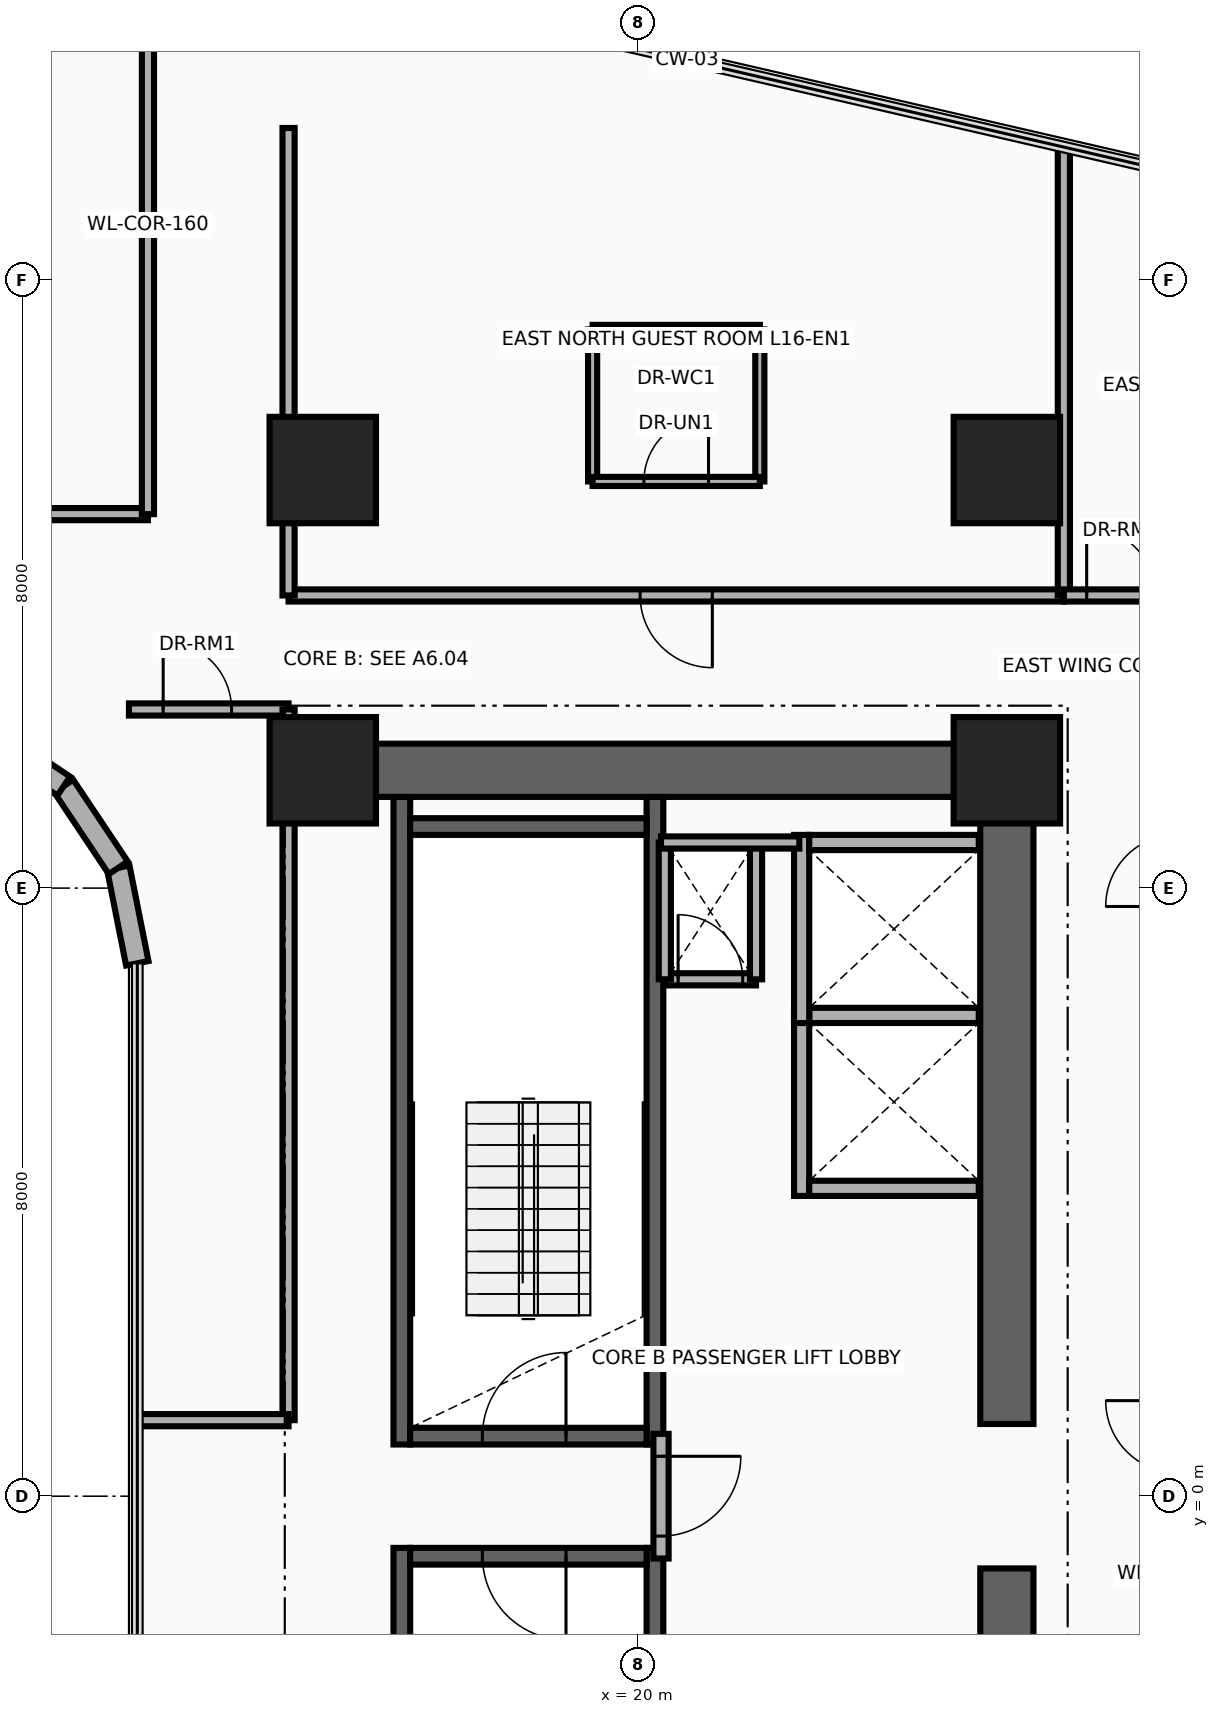
"""IFC4 building model, lengths in metres.
Left out: names, types, materials, properties, quantities, classifications, styles, units other than length and angle.
Written with IfcOpenShell. Run it as: python <this file> out.ifc"""

import sys

from ifc_helpers import new_model, si_unit, direction, frame, frame_2d, origin, origin_2d, place, context, subcontext, project, spatial, rectangle, extrude, source, transform, mapped, element, fill, save


model = new_model("IFC4")
c1 = context("Model", 3, precision=1e-05, world=origin(), true_north=direction((0.0, 1.0)))
c2 = subcontext(c1, "Body", "Model", "MODEL_VIEW")
j1 = project(units=[si_unit("LENGTHUNIT", "METRE"), si_unit("PLANEANGLEUNIT", "RADIAN")], contexts=[c1])
p1 = place(None, origin())
s1 = spatial("IfcSite", under=j1, at=p1, CompositionType="ELEMENT")
p2 = place(p1, origin())
s2 = spatial("IfcBuilding", under=s1, at=p2, CompositionType="ELEMENT")
p3 = place(p2, frame((0.0, 0.0, 66.7)))
s3 = spatial("IfcBuildingStorey", under=s2, at=p3, CompositionType="ELEMENT", Elevation=66.7)
for number, where, z_axis, x_axis in (
    (1, (16.89, 0.68, 0.0), (0.0, 0.0, 1.0), (0.0, 1.0, 0.0)),
    (2, (20.22, 0.68, 0.0), (0.0, 0.0, 1.0), (0.0, 1.0, 0.0)),
):
    element("IfcWall", number, at=place(p3, frame(where, z_axis=z_axis, x_axis=x_axis)), inside=s3, PredefinedType="SHEAR", context=c2, shape_type="SweptSolid", body=[
        extrude(rectangle(XDim=8.52, YDim=0.22, at=frame_2d((4.26, 0.0))), origin(), (0.0, 0.0, 1.0), 3.46),
    ])
p4 = place(p3, frame((17.0, 0.79, 0.0), z_axis=(0.0, 0.0, 1.0), x_axis=(1.0, 0.0, 0.0)))
e3 = element("IfcWall", 3, at=p4, inside=s3, PredefinedType="SHEAR", context=c2, shape_type="SweptSolid", body=[
    extrude(rectangle(XDim=3.11, YDim=0.22, at=frame_2d((1.555, 0.0))), origin(), (0.0, 0.0, 1.0), 3.46),
])
p5 = place(p4, frame((0.95, 0.0, 0.0)))
e4 = element("IfcOpeningElement", 4, at=p5, cuts=e3, PredefinedType="OPENING", context=c2, shape_type="SweptSolid", body=[
    extrude(rectangle(XDim=1.1, YDim=2.15, at=frame_2d((0.55, 1.075))), frame((0.0, 0.125, 0.0), z_axis=(0.0, -1.0, 0.0), x_axis=(1.0, 0.0, 0.0)), (0.0, 0.0, 1.0), 0.25),
])
p6 = place(p3, frame((17.0, 8.81, 0.0), z_axis=(0.0, 0.0, 1.0), x_axis=(1.0, 0.0, 0.0)))
e5 = element("IfcWall", 5, at=p6, inside=s3, PredefinedType="SHEAR", context=c2, shape_type="SweptSolid", body=[
    extrude(rectangle(XDim=3.11, YDim=0.22, at=frame_2d((1.555, 0.0))), origin(), (0.0, 0.0, 1.0), 3.46),
])
for number, where, z_axis, x_axis in (
    (6, (16.89, -9.2, 0.0), (0.0, 0.0, 1.0), (0.0, 1.0, 0.0)),
    (7, (20.22, -9.2, 0.0), (0.0, 0.0, 1.0), (0.0, 1.0, 0.0)),
):
    element("IfcWall", number, at=place(p3, frame(where, z_axis=z_axis, x_axis=x_axis)), inside=s3, PredefinedType="SHEAR", context=c2, shape_type="SweptSolid", body=[
        extrude(rectangle(XDim=8.52, YDim=0.22, at=frame_2d((4.26, 0.0))), origin(), (0.0, 0.0, 1.0), 3.46),
    ])
p7 = place(p3, frame((17.0, -0.79, 0.0), z_axis=(0.0, 0.0, 1.0), x_axis=(1.0, 0.0, 0.0)))
e8 = element("IfcWall", 8, at=p7, inside=s3, PredefinedType="SHEAR", context=c2, shape_type="SweptSolid", body=[
    extrude(rectangle(XDim=3.11, YDim=0.22, at=frame_2d((1.555, 0.0))), origin(), (0.0, 0.0, 1.0), 3.46),
])
p8 = place(p7, frame((0.95, 0.0, 0.0)))
e9 = element("IfcOpeningElement", 9, at=p8, cuts=e8, PredefinedType="OPENING", context=c2, shape_type="SweptSolid", body=[
    extrude(rectangle(XDim=1.1, YDim=2.15, at=frame_2d((0.55, 1.075))), frame((0.0, 0.125, 0.0), z_axis=(0.0, -1.0, 0.0), x_axis=(1.0, 0.0, 0.0)), (0.0, 0.0, 1.0), 0.25),
])
for number, where, z_axis, x_axis in (
    (10, (24.85, -9.9, 0.0), (0.0, 0.0, 1.0), (0.0, 1.0, 0.0)),
    (11, (24.85, 0.95, 0.0), (0.0, 0.0, 1.0), (0.0, 1.0, 0.0)),
):
    element("IfcWall", number, at=place(p3, frame(where, z_axis=z_axis, x_axis=x_axis)), inside=s3, PredefinedType="SHEAR", context=c2, shape_type="SweptSolid", body=[
        extrude(rectangle(XDim=8.95, YDim=0.7, at=frame_2d((4.475, 0.0))), origin(), (0.0, 0.0, 1.0), 3.46),
    ])
p9 = place(p3, frame((15.85, 9.55, 0.0), z_axis=(0.0, 0.0, 1.0), x_axis=(1.0, 0.0, 0.0)))
e12 = element("IfcWall", 12, at=p9, inside=s3, PredefinedType="SHEAR", context=c2, shape_type="SweptSolid", body=[
    extrude(rectangle(XDim=9.0, YDim=0.7, at=frame_2d((4.5, 0.0))), origin(), (0.0, 0.0, 1.0), 3.46),
])
m1 = source(origin(), c2, "Body", "SweptSolid", [
    extrude(rectangle(XDim=1.4, YDim=1.4, at=origin_2d()), origin(), (0.0, 0.0, 1.0), 3.7),
])
for number, where, z_axis, x_axis in (
    (13, (15.85, 9.55, 0.0), (0.0, 0.0, 1.0), (1.0, 0.0, 0.0)),
    (14, (24.85, 9.55, 0.0), (0.0, 0.0, 1.0), (1.0, 0.0, 0.0)),
    (15, (15.85, 13.5, 0.0), (0.0, 0.0, 1.0), (1.0, 0.0, 0.0)),
    (16, (24.85, 13.5, 0.0), (0.0, 0.0, 1.0), (1.0, 0.0, 0.0)),
):
    element("IfcColumn", number, at=place(p3, frame(where, z_axis=z_axis, x_axis=x_axis)), inside=s3, PredefinedType="COLUMN", context=c2, shape_type="MappedRepresentation", body=[
        mapped(m1, transform((0.0, 0.0, 0.0), x_axis=(1.0, 0.0, 0.0), y_axis=(0.0, 1.0, 0.0), z_axis=(0.0, 0.0, 1.0), scale=1.0)),
    ])
p10 = place(p3, frame((13.41, 7.011, 0.0), z_axis=(0.0, 0.0, 1.0), x_axis=(-0.195090163074, 0.980785312019, 0.0)))
e17 = element("IfcWall", 17, at=p10, inside=s3, PredefinedType="SOLIDWALL", context=c2, shape_type="SweptSolid", body=[
    extrude(rectangle(XDim=1.281, YDim=0.3, at=frame_2d((0.641, 0.0))), origin(), (0.0, 0.0, 1.0), 3.46),
])
for number, where, z_axis, x_axis in (
    (18, (13.16, 8.268, 0.0), (0.0, 0.0, 1.0), (-0.556, 0.831, 0.0)),
    (19, (12.442, 9.342, 0.0), (0.0, 0.0, 1.0), (-0.831, 0.556, 0.0)),
):
    element("IfcWall", number, at=place(p3, frame(where, z_axis=z_axis, x_axis=x_axis)), inside=s3, PredefinedType="SOLIDWALL", context=c2, shape_type="SweptSolid", body=[
        extrude(rectangle(XDim=1.292, YDim=0.3, at=frame_2d((0.646, 0.0))), origin(), (0.0, 0.0, 1.0), 3.46),
    ])
p11 = place(p3, frame((22.15, 3.95, 0.0), z_axis=(0.0, 0.0, 1.0), x_axis=(0.0, 1.0, 0.0)))
e20 = element("IfcWall", 20, at=p11, inside=s3, PredefinedType="MOVABLE", context=c2, shape_type="SweptSolid", body=[
    extrude(rectangle(XDim=2.475, YDim=0.2, at=frame_2d((1.238, 0.0))), origin(), (0.0, 0.0, 1.0), 3.46),
])
for number, where, z_axis, x_axis in (
    (21, (22.25, 4.05, 0.0), (0.0, 0.0, 1.0), (1.0, 0.0, 0.0)),
    (22, (22.25, 6.325, 0.0), (0.0, 0.0, 1.0), (1.0, 0.0, 0.0)),
):
    element("IfcWall", number, at=place(p3, frame(where, z_axis=z_axis, x_axis=x_axis)), inside=s3, PredefinedType="MOVABLE", context=c2, shape_type="SweptSolid", body=[
        extrude(rectangle(XDim=2.23, YDim=0.2, at=frame_2d((1.115, 0.0))), origin(), (0.0, 0.0, 1.0), 2.245),
    ])
p12 = place(p3, frame((22.15, 6.225, 0.0), z_axis=(0.0, 0.0, 1.0), x_axis=(0.0, 1.0, 0.0)))
e23 = element("IfcWall", 23, at=p12, inside=s3, PredefinedType="MOVABLE", context=c2, shape_type="SweptSolid", body=[
    extrude(rectangle(XDim=2.475, YDim=0.2, at=frame_2d((1.237, 0.0))), origin(), (0.0, 0.0, 1.0), 3.46),
])
p13 = place(p3, frame((22.25, 8.6, 0.0), z_axis=(0.0, 0.0, 1.0), x_axis=(1.0, 0.0, 0.0)))
e24 = element("IfcWall", 24, at=p13, inside=s3, PredefinedType="MOVABLE", context=c2, shape_type="SweptSolid", body=[
    extrude(rectangle(XDim=2.23, YDim=0.2, at=frame_2d((1.115, 0.0))), origin(), (0.0, 0.0, 1.0), 2.245),
])
p14 = place(p3, frame((20.3, -0.82, 0.0), z_axis=(0.0, 0.0, 1.0), x_axis=(0.0, 1.0, 0.0)))
e25 = element("IfcWall", 25, at=p14, inside=s3, PredefinedType="PARTITIONING", context=c2, shape_type="SweptSolid", body=[
    extrude(rectangle(XDim=1.64, YDim=0.2, at=frame_2d((0.82, 0.0))), origin(), (0.0, 0.0, 1.0), 3.46),
])
p15 = place(p14, frame((0.295, 0.0, 0.0)))
e26 = element("IfcOpeningElement", 26, at=p15, cuts=e25, PredefinedType="OPENING", context=c2, shape_type="SweptSolid", body=[
    extrude(rectangle(XDim=1.05, YDim=2.15, at=frame_2d((0.525, 1.075))), frame((0.0, 0.115, 0.0), z_axis=(0.0, -1.0, 0.0), x_axis=(1.0, 0.0, 0.0)), (0.0, 0.0, 1.0), 0.23),
])
p16 = place(p3, frame((20.35, 6.8, 0.0), z_axis=(0.0, 0.0, 1.0), x_axis=(1.0, 0.0, 0.0)))
e27 = element("IfcWall", 27, at=p16, inside=s3, PredefinedType="PARTITIONING", context=c2, shape_type="SweptSolid", body=[
    extrude(rectangle(XDim=1.2, YDim=0.16, at=frame_2d((0.6, 0.0))), origin(), (0.0, 0.0, 1.0), 3.46),
])
p17 = place(p16, frame((0.175, 0.0, 0.0)))
e28 = element("IfcOpeningElement", 28, at=p17, cuts=e27, PredefinedType="OPENING", context=c2, shape_type="SweptSolid", body=[
    extrude(rectangle(XDim=0.85, YDim=2.05, at=frame_2d((0.425, 1.025))), frame((0.0, 0.095, 0.0), z_axis=(0.0, -1.0, 0.0), x_axis=(1.0, 0.0, 0.0)), (0.0, 0.0, 1.0), 0.19),
])
for number, where, z_axis, x_axis in (
    (29, (21.55, 6.8, 0.0), (0.0, 0.0, 1.0), (0.0, 1.0, 0.0)),
    (30, (20.35, 6.8, 0.0), (0.0, 0.0, 1.0), (0.0, 1.0, 0.0)),
):
    element("IfcWall", number, at=place(p3, frame(where, z_axis=z_axis, x_axis=x_axis)), inside=s3, PredefinedType="PARTITIONING", context=c2, shape_type="SweptSolid", body=[
        extrude(rectangle(XDim=1.8, YDim=0.16, at=frame_2d((0.9, 0.0))), origin(), (0.0, 0.0, 1.0), 3.46),
    ])
p18 = place(p3, frame((20.3, 8.6, 0.0), z_axis=(0.0, 0.0, 1.0), x_axis=(1.0, 0.0, 0.0)))
e31 = element("IfcWall", 31, at=p18, inside=s3, PredefinedType="PARTITIONING", context=c2, shape_type="SweptSolid", body=[
    extrude(rectangle(XDim=1.82, YDim=0.16, at=frame_2d((0.91, 0.0))), origin(), (0.0, 0.0, 1.0), 3.46),
])
p19 = place(p3, frame((-31.89, 12.92, 0.0), z_axis=(0.0, 0.0, 1.0), x_axis=(1.0, 0.0, 0.0)))
e32 = element("IfcWall", 32, at=p19, inside=s3, PredefinedType="PARTITIONING", context=c2, shape_type="SweptSolid", body=[
    extrude(rectangle(XDim=45.44, YDim=0.16, at=frame_2d((22.72, 0.0))), origin(), (0.0, 0.0, 1.0), 2.583),
])
p20 = place(p19, frame((6.057, 0.0, 0.0)))
e33 = element("IfcOpeningElement", 33, at=p20, cuts=e32, PredefinedType="OPENING", context=c2, shape_type="SweptSolid", body=[
    extrude(rectangle(XDim=1.8, YDim=2.15, at=frame_2d((0.9, 1.075))), frame((0.0, 0.095, 0.0), z_axis=(0.0, -1.0, 0.0), x_axis=(1.0, 0.0, 0.0)), (0.0, 0.0, 1.0), 0.19),
])
p21 = place(p19, frame((20.895, 0.0, 0.0)))
e34 = element("IfcOpeningElement", 34, at=p21, cuts=e32, PredefinedType="OPENING", context=c2, shape_type="SweptSolid", body=[
    extrude(rectangle(XDim=1.8, YDim=2.15, at=frame_2d((0.9, 1.075))), frame((0.0, 0.095, 0.0), z_axis=(0.0, -1.0, 0.0), x_axis=(1.0, 0.0, 0.0)), (0.0, 0.0, 1.0), 0.19),
])
p22 = place(p19, frame((36.658, 0.0, 0.0)))
e35 = element("IfcOpeningElement", 35, at=p22, cuts=e32, PredefinedType="OPENING", context=c2, shape_type="SweptSolid", body=[
    extrude(rectangle(XDim=1.8, YDim=2.15, at=frame_2d((0.9, 1.075))), frame((0.0, 0.095, 0.0), z_axis=(0.0, -1.0, 0.0), x_axis=(1.0, 0.0, 0.0)), (0.0, 0.0, 1.0), 0.19),
])
p23 = place(p3, frame((13.55, 12.92, 0.0), z_axis=(0.0, 0.0, 1.0), x_axis=(0.0, 1.0, 0.0)))
e36 = element("IfcWall", 36, at=p23, inside=s3, PredefinedType="PARTITIONING", context=c2, shape_type="SweptSolid", body=[
    extrude(rectangle(XDim=7.609, YDim=0.16, at=frame_2d((3.805, 0.0))), origin(), (0.0, 0.0, 1.0), 2.583),
])
p24 = place(p3, frame((15.4, 11.85, 0.0), z_axis=(0.0, 0.0, 1.0), x_axis=(1.0, 0.0, 0.0)))
e37 = element("IfcWall", 37, at=p24, inside=s3, PredefinedType="PARTITIONING", context=c2, shape_type="SweptSolid", body=[
    extrude(rectangle(XDim=10.2, YDim=0.16, at=frame_2d((5.1, 0.0))), origin(), (0.0, 0.0, 1.0), 2.834),
])
p25 = place(p24, frame((4.625, 0.0, 0.0)))
e38 = element("IfcOpeningElement", 38, at=p25, cuts=e37, PredefinedType="OPENING", context=c2, shape_type="SweptSolid", body=[
    extrude(rectangle(XDim=0.95, YDim=2.15, at=frame_2d((0.475, 1.075))), frame((0.0, 0.095, 0.0), z_axis=(0.0, -1.0, 0.0), x_axis=(1.0, 0.0, 0.0)), (0.0, 0.0, 1.0), 0.19),
])
p26 = place(p3, frame((15.4, 11.85, 0.0), z_axis=(0.0, 0.0, 1.0), x_axis=(0.0, 1.0, 0.0)))
e39 = element("IfcWall", 39, at=p26, inside=s3, PredefinedType="PARTITIONING", context=c2, shape_type="SweptSolid", body=[
    extrude(rectangle(XDim=6.15, YDim=0.16, at=frame_2d((3.075, 0.0))), origin(), (0.0, 0.0, 1.0), 2.583),
])
p27 = place(p3, frame((25.6, 11.85, 0.0), z_axis=(0.0, 0.0, 1.0), x_axis=(0.0, 1.0, 0.0)))
e40 = element("IfcWall", 40, at=p27, inside=s3, PredefinedType="PARTITIONING", context=c2, shape_type="SweptSolid", body=[
    extrude(rectangle(XDim=5.898, YDim=0.16, at=frame_2d((2.949, 0.0))), origin(), (0.0, 0.0, 1.0), 2.583),
])
for number, where, z_axis, x_axis in (
    (41, (19.4, 13.35, 0.0), (0.0, 0.0, 1.0), (0.0, 1.0, 0.0)),
    (42, (21.6, 13.35, 0.0), (0.0, 0.0, 1.0), (0.0, 1.0, 0.0)),
):
    element("IfcWall", number, at=place(p3, frame(where, z_axis=z_axis, x_axis=x_axis)), inside=s3, PredefinedType="PARTITIONING", context=c2, shape_type="SweptSolid", body=[
        extrude(rectangle(XDim=2.0, YDim=0.12, at=frame_2d((1.0, 0.0))), origin(), (0.0, 0.0, 1.0), 2.583),
    ])
p28 = place(p3, frame((19.4, 15.35, 0.0), z_axis=(0.0, 0.0, 1.0), x_axis=(1.0, 0.0, 0.0)))
e43 = element("IfcWall", 43, at=p28, inside=s3, PredefinedType="PARTITIONING", context=c2, shape_type="SweptSolid", body=[
    extrude(rectangle(XDim=2.2, YDim=0.12, at=frame_2d((1.1, 0.0))), origin(), (0.0, 0.0, 1.0), 3.46),
])
p29 = place(p3, frame((19.4, 13.35, 0.0), z_axis=(0.0, 0.0, 1.0), x_axis=(1.0, 0.0, 0.0)))
e44 = element("IfcWall", 44, at=p29, inside=s3, PredefinedType="PARTITIONING", context=c2, shape_type="SweptSolid", body=[
    extrude(rectangle(XDim=2.2, YDim=0.12, at=frame_2d((1.1, 0.0))), origin(), (0.0, 0.0, 1.0), 2.583),
])
p30 = place(p29, frame((0.675, 0.0, 0.0)))
e45 = element("IfcOpeningElement", 45, at=p30, cuts=e44, PredefinedType="OPENING", context=c2, shape_type="SweptSolid", body=[
    extrude(rectangle(XDim=0.85, YDim=2.1, at=frame_2d((0.425, 1.05))), frame((0.0, 0.075, 0.0), z_axis=(0.0, -1.0, 0.0), x_axis=(1.0, 0.0, 0.0)), (0.0, 0.0, 1.0), 0.15),
])
p31 = place(p3, frame((25.6, 11.85, 0.0), z_axis=(0.0, 0.0, 1.0), x_axis=(1.0, 0.0, 0.0)))
e46 = element("IfcWall", 46, at=p31, inside=s3, PredefinedType="PARTITIONING", context=c2, shape_type="SweptSolid", body=[
    extrude(rectangle(XDim=5.79, YDim=0.16, at=frame_2d((2.895, 0.0))), origin(), (0.0, 0.0, 1.0), 2.896),
])
p32 = place(p31, frame((0.3, 0.0, 0.0)))
e47 = element("IfcOpeningElement", 47, at=p32, cuts=e46, PredefinedType="OPENING", context=c2, shape_type="SweptSolid", body=[
    extrude(rectangle(XDim=0.9, YDim=2.1, at=frame_2d((0.45, 1.05))), frame((0.0, 0.095, 0.0), z_axis=(0.0, -1.0, 0.0), x_axis=(1.0, 0.0, 0.0)), (0.0, 0.0, 1.0), 0.19),
])
p33 = place(p3, frame((13.3, 10.35, 0.0), z_axis=(0.0, 0.0, 1.0), x_axis=(1.0, 0.0, 0.0)))
e48 = element("IfcWall", 48, at=p33, inside=s3, PredefinedType="PARTITIONING", context=c2, shape_type="SweptSolid", body=[
    extrude(rectangle(XDim=2.1, YDim=0.16, at=frame_2d((1.05, 0.0))), origin(), (0.0, 0.0, 1.0), 2.583),
])
p34 = place(p33, frame((0.45, 0.0, 0.0)))
e49 = element("IfcOpeningElement", 49, at=p34, cuts=e48, PredefinedType="OPENING", context=c2, shape_type="SweptSolid", body=[
    extrude(rectangle(XDim=0.9, YDim=2.1, at=frame_2d((0.45, 1.05))), frame((0.0, 0.095, 0.0), z_axis=(0.0, -1.0, 0.0), x_axis=(1.0, 0.0, 0.0)), (0.0, 0.0, 1.0), 0.19),
])
p35 = place(p3, frame((15.4, 1.0, 0.0), z_axis=(0.0, 0.0, 1.0), x_axis=(0.0, 1.0, 0.0)))
e50 = element("IfcWall", 50, at=p35, inside=s3, PredefinedType="PARTITIONING", context=c2, shape_type="SweptSolid", body=[
    extrude(rectangle(XDim=9.35, YDim=0.16, at=frame_2d((4.675, 0.0))), origin(), (0.0, 0.0, 1.0), 2.245),
])
p36 = place(p3, frame((13.41, 1.0, 0.0), z_axis=(0.0, 0.0, 1.0), x_axis=(1.0, 0.0, 0.0)))
e51 = element("IfcWall", 51, at=p36, inside=s3, PredefinedType="PARTITIONING", context=c2, shape_type="SweptSolid", body=[
    extrude(rectangle(XDim=1.99, YDim=0.16, at=frame_2d((0.995, 0.0))), origin(), (0.0, 0.0, 1.0), 2.245),
])
p37 = place(p15, frame((1.05, 0.0, 0.0), z_axis=(0.0, 0.0, 1.0), x_axis=(-1.0, 0.0, 0.0)))
e52 = element("IfcDoor", 52, at=p37, inside=s3, OperationType="SINGLE_SWING_LEFT", PredefinedType="DOOR", context=c2, shape_type="SweptSolid", body=[
    extrude(rectangle(XDim=1.05, YDim=2.15, at=frame_2d((0.525, 1.075))), frame((0.0, 0.025, 0.0), z_axis=(0.0, -1.0, 0.0), x_axis=(1.0, 0.0, 0.0)), (0.0, 0.0, 1.0), 0.05),
])
fill(e26, e52)
p38 = place(p5, origin())
e53 = element("IfcDoor", 53, at=p38, inside=s3, OperationType="SINGLE_SWING_RIGHT", PredefinedType="DOOR", context=c2, shape_type="SweptSolid", body=[
    extrude(rectangle(XDim=1.1, YDim=2.15, at=frame_2d((0.55, 1.075))), frame((0.0, 0.025, 0.0), z_axis=(0.0, -1.0, 0.0), x_axis=(1.0, 0.0, 0.0)), (0.0, 0.0, 1.0), 0.05),
])
fill(e4, e53)
p39 = place(p8, frame((1.1, 0.0, 0.0), z_axis=(0.0, 0.0, 1.0), x_axis=(-1.0, 0.0, 0.0)))
e54 = element("IfcDoor", 54, at=p39, inside=s3, OperationType="SINGLE_SWING_LEFT", PredefinedType="DOOR", context=c2, shape_type="SweptSolid", body=[
    extrude(rectangle(XDim=1.1, YDim=2.15, at=frame_2d((0.55, 1.075))), frame((0.0, 0.025, 0.0), z_axis=(0.0, -1.0, 0.0), x_axis=(1.0, 0.0, 0.0)), (0.0, 0.0, 1.0), 0.05),
])
fill(e9, e54)
p40 = place(p17, origin())
e55 = element("IfcDoor", 55, at=p40, inside=s3, OperationType="SINGLE_SWING_RIGHT", PredefinedType="DOOR", context=c2, shape_type="SweptSolid", body=[
    extrude(rectangle(XDim=0.85, YDim=2.05, at=frame_2d((0.425, 1.025))), frame((0.0, 0.025, 0.0), z_axis=(0.0, -1.0, 0.0), x_axis=(1.0, 0.0, 0.0)), (0.0, 0.0, 1.0), 0.05),
])
fill(e28, e55)
p41 = place(p25, frame((0.95, 0.0, 0.0), z_axis=(0.0, 0.0, 1.0), x_axis=(-1.0, 0.0, 0.0)))
e56 = element("IfcDoor", 56, at=p41, inside=s3, OperationType="SINGLE_SWING_LEFT", PredefinedType="DOOR", context=c2, shape_type="SweptSolid", body=[
    extrude(rectangle(XDim=0.95, YDim=2.15, at=frame_2d((0.475, 1.075))), frame((0.0, 0.025, 0.0), z_axis=(0.0, -1.0, 0.0), x_axis=(1.0, 0.0, 0.0)), (0.0, 0.0, 1.0), 0.05),
])
fill(e38, e56)
p42 = place(p30, origin())
e57 = element("IfcDoor", 57, at=p42, inside=s3, OperationType="SINGLE_SWING_RIGHT", PredefinedType="DOOR", context=c2, shape_type="SweptSolid", body=[
    extrude(rectangle(XDim=0.85, YDim=2.1, at=frame_2d((0.425, 1.05))), frame((0.0, 0.025, 0.0), z_axis=(0.0, -1.0, 0.0), x_axis=(1.0, 0.0, 0.0)), (0.0, 0.0, 1.0), 0.05),
])
fill(e45, e57)
p43 = place(p32, origin())
e58 = element("IfcDoor", 58, at=p43, inside=s3, OperationType="SINGLE_SWING_LEFT", PredefinedType="DOOR", context=c2, shape_type="SweptSolid", body=[
    extrude(rectangle(XDim=0.9, YDim=2.1, at=frame_2d((0.45, 1.05))), frame((0.0, 0.025, 0.0), z_axis=(0.0, -1.0, 0.0), x_axis=(1.0, 0.0, 0.0)), (0.0, 0.0, 1.0), 0.05),
])
fill(e47, e58)
p44 = place(p34, origin())
e59 = element("IfcDoor", 59, at=p44, inside=s3, OperationType="SINGLE_SWING_RIGHT", PredefinedType="DOOR", context=c2, shape_type="SweptSolid", body=[
    extrude(rectangle(XDim=0.9, YDim=2.1, at=frame_2d((0.45, 1.05))), frame((0.0, 0.025, 0.0), z_axis=(0.0, -1.0, 0.0), x_axis=(1.0, 0.0, 0.0)), (0.0, 0.0, 1.0), 0.05),
])
fill(e49, e59)
save(model, sys.argv[1])
